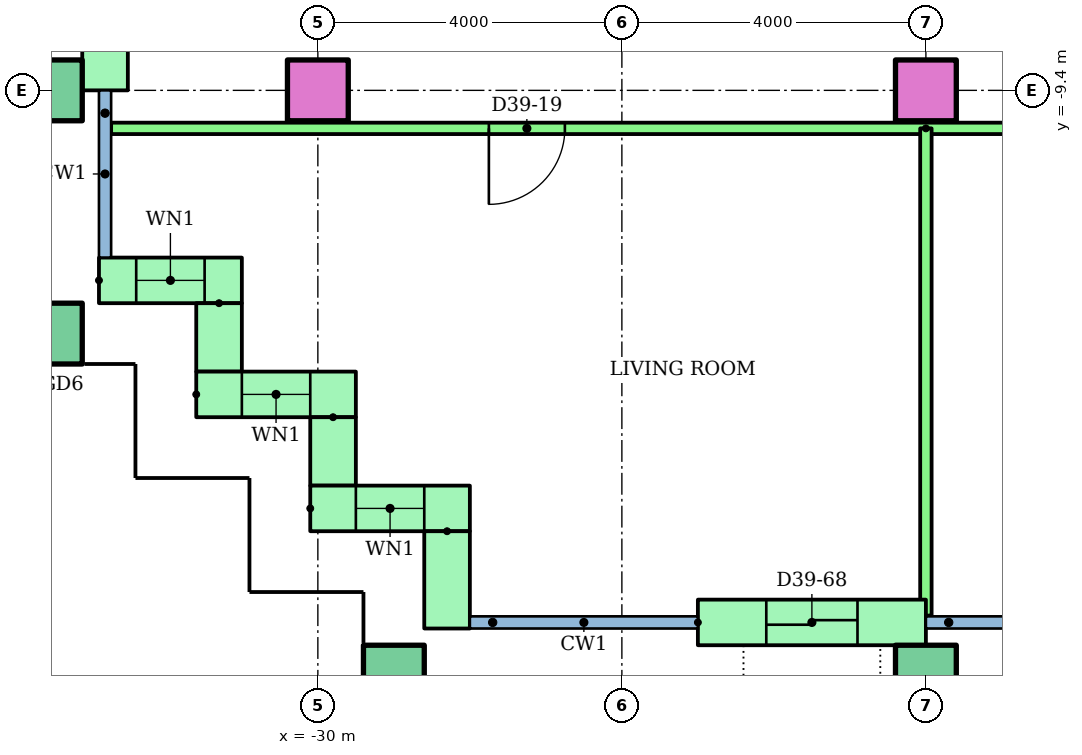
"""IFC4 building model, lengths in metres.
Left out: names, types, materials, properties, quantities, classifications, styles, units other than length and angle.
Written with IfcOpenShell. Run it as: python <this file> out.ifc"""

import sys

from ifc_helpers import new_model, si_unit, direction, frame, frame_2d, origin, origin_2d, place, context, subcontext, project, spatial, rectangle, hollow_rectangle, extrude, element, fill, save


model = new_model("IFC4")
c1 = context("Model", 3, precision=1e-05, world=origin(), true_north=direction((0.0, 1.0)))
c2 = subcontext(c1, "Body", "Model", "MODEL_VIEW")
j1 = project(units=[si_unit("LENGTHUNIT", "METRE"), si_unit("PLANEANGLEUNIT", "RADIAN")], contexts=[c1])
p1 = place(None, origin())
s1 = spatial("IfcSite", under=j1, at=p1, CompositionType="ELEMENT")
p2 = place(p1, origin())
s2 = spatial("IfcBuilding", under=s1, at=p2, CompositionType="ELEMENT")
p3 = place(p2, frame((0.0, 0.0, 148.6)))
s3 = spatial("IfcBuildingStorey", under=s2, at=p3, CompositionType="ELEMENT", Elevation=148.6)
for number, where in (
    (1, (-29.0, -17.1, 0.0)),
    (2, (-22.0, -17.1, 0.0)),
    (3, (-33.5, -12.6, 0.0)),
    (4, (-33.5, -9.4, 0.0)),
):
    element("IfcColumn", number, at=place(p3, frame(where)), inside=s3, PredefinedType="COLUMN", context=c2, shape_type="SweptSolid", body=[
        extrude(hollow_rectangle(XDim=0.8, YDim=0.8, WallThickness=0.04, at=origin_2d()), origin(), (0.0, 0.0, 1.0), 3.2),
    ])
for number, where in (
    (5, (-30.0, -9.4, 0.0)),
    (6, (-22.0, -9.4, 0.0)),
):
    element("IfcColumn", number, at=place(p3, frame(where)), inside=s3, PredefinedType="COLUMN", context=c2, shape_type="SweptSolid", body=[
        extrude(rectangle(XDim=0.8, YDim=0.8, at=origin_2d()), origin(), (0.0, 0.0, 1.0), 3.2),
    ])
p4 = place(p3, frame((-32.8, -5.7, 0.0), z_axis=(0.0, 0.0, 1.0), x_axis=(0.0, -1.0, 0.0)))
e7 = element("IfcWall", 7, at=p4, inside=s3, PredefinedType="STANDARD", context=c2, shape_type="SweptSolid", body=[
    extrude(rectangle(XDim=3.7, YDim=0.6, at=frame_2d((1.85, 0.0))), origin(), (0.0, 0.0, 1.0), 2.8),
])
p5 = place(p4, frame((1.25, 0.0, 0.0)))
e8 = element("IfcOpeningElement", 8, at=p5, cuts=e7, PredefinedType="OPENING", context=c2, shape_type="SweptSolid", body=[
    extrude(rectangle(XDim=1.2, YDim=2.1, at=frame_2d((0.6, 1.05))), frame((0.0, 0.31, 0.0), z_axis=(0.0, -1.0, 0.0), x_axis=(1.0, 0.0, 0.0)), (0.0, 0.0, 1.0), 0.62),
])
p6 = place(p3, frame((-32.88, -11.9, 0.0)))
e9 = element("IfcWall", 9, at=p6, inside=s3, PredefinedType="STANDARD", context=c2, shape_type="SweptSolid", body=[
    extrude(rectangle(XDim=1.88, YDim=0.6, at=frame_2d((0.94, 0.0))), origin(), (0.0, 0.0, 1.0), 2.8),
])
p7 = place(p6, frame((0.49, 0.0, 0.9)))
e10 = element("IfcOpeningElement", 10, at=p7, cuts=e9, PredefinedType="OPENING", context=c2, shape_type="SweptSolid", body=[
    extrude(rectangle(XDim=0.9, YDim=1.5, at=frame_2d((0.45, 0.75))), frame((0.0, 0.31, 0.0), z_axis=(0.0, -1.0, 0.0), x_axis=(1.0, 0.0, 0.0)), (0.0, 0.0, 1.0), 0.62),
])
p8 = place(p3, frame((-31.3, -12.2, 0.0), z_axis=(0.0, 0.0, 1.0), x_axis=(0.0, -1.0, 0.0)))
e11 = element("IfcWall", 11, at=p8, inside=s3, PredefinedType="STANDARD", context=c2, shape_type="SweptSolid", body=[
    extrude(rectangle(XDim=0.9, YDim=0.6, at=frame_2d((0.45, 0.0))), origin(), (0.0, 0.0, 1.0), 2.8),
])
p9 = place(p3, frame((-31.6, -13.4, 0.0)))
e12 = element("IfcWall", 12, at=p9, inside=s3, PredefinedType="STANDARD", context=c2, shape_type="SweptSolid", body=[
    extrude(rectangle(XDim=2.1, YDim=0.6, at=frame_2d((1.05, 0.0))), origin(), (0.0, 0.0, 1.0), 2.8),
])
p10 = place(p9, frame((0.6, 0.0, 0.9)))
e13 = element("IfcOpeningElement", 13, at=p10, cuts=e12, PredefinedType="OPENING", context=c2, shape_type="SweptSolid", body=[
    extrude(rectangle(XDim=0.9, YDim=1.5, at=frame_2d((0.45, 0.75))), frame((0.0, 0.31, 0.0), z_axis=(0.0, -1.0, 0.0), x_axis=(1.0, 0.0, 0.0)), (0.0, 0.0, 1.0), 0.62),
])
p11 = place(p3, frame((-29.8, -13.7, 0.0), z_axis=(0.0, 0.0, 1.0), x_axis=(0.0, -1.0, 0.0)))
e14 = element("IfcWall", 14, at=p11, inside=s3, PredefinedType="STANDARD", context=c2, shape_type="SweptSolid", body=[
    extrude(rectangle(XDim=0.9, YDim=0.6, at=frame_2d((0.45, 0.0))), origin(), (0.0, 0.0, 1.0), 2.8),
])
p12 = place(p3, frame((-30.1, -14.9, 0.0)))
e15 = element("IfcWall", 15, at=p12, inside=s3, PredefinedType="STANDARD", context=c2, shape_type="SweptSolid", body=[
    extrude(rectangle(XDim=2.1, YDim=0.6, at=frame_2d((1.05, 0.0))), origin(), (0.0, 0.0, 1.0), 2.8),
])
p13 = place(p12, frame((0.6, 0.0, 0.9)))
e16 = element("IfcOpeningElement", 16, at=p13, cuts=e15, PredefinedType="OPENING", context=c2, shape_type="SweptSolid", body=[
    extrude(rectangle(XDim=0.9, YDim=1.5, at=frame_2d((0.45, 0.75))), frame((0.0, 0.31, 0.0), z_axis=(0.0, -1.0, 0.0), x_axis=(1.0, 0.0, 0.0)), (0.0, 0.0, 1.0), 0.62),
])
p14 = place(p3, frame((-28.3, -15.2, 0.0), z_axis=(0.0, 0.0, 1.0), x_axis=(0.0, -1.0, 0.0)))
e17 = element("IfcWall", 17, at=p14, inside=s3, PredefinedType="STANDARD", context=c2, shape_type="SweptSolid", body=[
    extrude(rectangle(XDim=1.28, YDim=0.6, at=frame_2d((0.64, 0.0))), origin(), (0.0, 0.0, 1.0), 2.8),
])
p15 = place(p3, frame((-25.0, -16.4, 0.0)))
e18 = element("IfcWall", 18, at=p15, inside=s3, PredefinedType="STANDARD", context=c2, shape_type="SweptSolid", body=[
    extrude(rectangle(XDim=3.0, YDim=0.6, at=frame_2d((1.5, 0.0))), origin(), (0.0, 0.0, 1.0), 2.8),
])
p16 = place(p15, frame((0.9, 0.0, 0.0)))
e19 = element("IfcOpeningElement", 19, at=p16, cuts=e18, PredefinedType="OPENING", context=c2, shape_type="SweptSolid", body=[
    extrude(rectangle(XDim=1.2, YDim=2.1, at=frame_2d((0.6, 1.05))), frame((0.0, 0.31, 0.0), z_axis=(0.0, -1.0, 0.0), x_axis=(1.0, 0.0, 0.0)), (0.0, 0.0, 1.0), 0.62),
])
p17 = place(p3, frame((-6.0, -9.9, 0.0), z_axis=(0.0, 0.0, 1.0), x_axis=(-1.0, 0.0, 0.0)))
e20 = element("IfcWall", 20, at=p17, inside=s3, PredefinedType="PARTITIONING", context=c2, shape_type="SweptSolid", body=[
    extrude(rectangle(XDim=26.72, YDim=0.15, at=frame_2d((13.36, 0.0))), origin(), (0.0, 0.0, 1.0), 2.4),
])
p18 = place(p17, frame((20.75, 0.0, 0.0)))
e21 = element("IfcOpeningElement", 21, at=p18, cuts=e20, PredefinedType="OPENING", context=c2, shape_type="SweptSolid", body=[
    extrude(rectangle(XDim=1.0, YDim=2.1, at=frame_2d((0.5, 1.05))), frame((0.0, 0.085, 0.0), z_axis=(0.0, -1.0, 0.0), x_axis=(1.0, 0.0, 0.0)), (0.0, 0.0, 1.0), 0.17),
])
p19 = place(p17, frame((13.55, 0.0, 0.0)))
e22 = element("IfcOpeningElement", 22, at=p19, cuts=e20, PredefinedType="OPENING", context=c2, shape_type="SweptSolid", body=[
    extrude(rectangle(XDim=0.9, YDim=2.1, at=frame_2d((0.45, 1.05))), frame((0.0, 0.085, 0.0), z_axis=(0.0, -1.0, 0.0), x_axis=(1.0, 0.0, 0.0)), (0.0, 0.0, 1.0), 0.17),
])
p20 = place(p17, frame((9.55, 0.0, 0.0)))
e23 = element("IfcOpeningElement", 23, at=p20, cuts=e20, PredefinedType="OPENING", context=c2, shape_type="SweptSolid", body=[
    extrude(rectangle(XDim=0.9, YDim=2.1, at=frame_2d((0.45, 1.05))), frame((0.0, 0.085, 0.0), z_axis=(0.0, -1.0, 0.0), x_axis=(1.0, 0.0, 0.0)), (0.0, 0.0, 1.0), 0.17),
])
p21 = place(p17, frame((5.55, 0.0, 0.0)))
e24 = element("IfcOpeningElement", 24, at=p21, cuts=e20, PredefinedType="OPENING", context=c2, shape_type="SweptSolid", body=[
    extrude(rectangle(XDim=0.9, YDim=2.1, at=frame_2d((0.45, 1.05))), frame((0.0, 0.085, 0.0), z_axis=(0.0, -1.0, 0.0), x_axis=(1.0, 0.0, 0.0)), (0.0, 0.0, 1.0), 0.17),
])
p22 = place(p17, frame((1.55, 0.0, 0.0)))
e25 = element("IfcOpeningElement", 25, at=p22, cuts=e20, PredefinedType="OPENING", context=c2, shape_type="SweptSolid", body=[
    extrude(rectangle(XDim=0.9, YDim=2.1, at=frame_2d((0.45, 1.05))), frame((0.0, 0.085, 0.0), z_axis=(0.0, -1.0, 0.0), x_axis=(1.0, 0.0, 0.0)), (0.0, 0.0, 1.0), 0.17),
])
p23 = place(p3, frame((-22.0, -9.9, 0.0), z_axis=(0.0, 0.0, 1.0), x_axis=(0.0, -1.0, 0.0)))
e26 = element("IfcWall", 26, at=p23, inside=s3, PredefinedType="PARTITIONING", context=c2, shape_type="SweptSolid", body=[
    extrude(rectangle(XDim=6.41, YDim=0.15, at=frame_2d((3.205, 0.0))), origin(), (0.0, 0.0, 1.0), 2.4),
])
p24 = place(p7, origin())
e27 = element("IfcWindow", 27, at=p24, inside=s3, PartitioningType="SINGLE_PANEL", PredefinedType="WINDOW", context=c2, shape_type="SweptSolid", body=[
    extrude(rectangle(XDim=0.9, YDim=1.5, at=frame_2d((0.45, 0.75))), frame((0.0, 0.03, 0.0), z_axis=(0.0, -1.0, 0.0), x_axis=(1.0, 0.0, 0.0)), (0.0, 0.0, 1.0), 0.06),
])
fill(e10, e27)
p25 = place(p10, origin())
e28 = element("IfcWindow", 28, at=p25, inside=s3, PartitioningType="SINGLE_PANEL", PredefinedType="WINDOW", context=c2, shape_type="SweptSolid", body=[
    extrude(rectangle(XDim=0.9, YDim=1.5, at=frame_2d((0.45, 0.75))), frame((0.0, 0.03, 0.0), z_axis=(0.0, -1.0, 0.0), x_axis=(1.0, 0.0, 0.0)), (0.0, 0.0, 1.0), 0.06),
])
fill(e13, e28)
p26 = place(p13, origin())
e29 = element("IfcWindow", 29, at=p26, inside=s3, PartitioningType="SINGLE_PANEL", PredefinedType="WINDOW", context=c2, shape_type="SweptSolid", body=[
    extrude(rectangle(XDim=0.9, YDim=1.5, at=frame_2d((0.45, 0.75))), frame((0.0, 0.03, 0.0), z_axis=(0.0, -1.0, 0.0), x_axis=(1.0, 0.0, 0.0)), (0.0, 0.0, 1.0), 0.06),
])
fill(e16, e29)
p27 = place(p18, origin())
e30 = element("IfcDoor", 30, at=p27, inside=s3, OperationType="SINGLE_SWING_RIGHT", PredefinedType="DOOR", context=c2, shape_type="SweptSolid", body=[
    extrude(rectangle(XDim=1.0, YDim=2.1, at=frame_2d((0.5, 1.05))), frame((0.0, 0.025, 0.0), z_axis=(0.0, -1.0, 0.0), x_axis=(1.0, 0.0, 0.0)), (0.0, 0.0, 1.0), 0.05),
])
fill(e21, e30)
p28 = place(p16, origin())
e31 = element("IfcDoor", 31, at=p28, inside=s3, OperationType="SLIDING_TO_LEFT", PredefinedType="DOOR", context=c2, shape_type="SweptSolid", body=[
    extrude(rectangle(XDim=1.2, YDim=2.1, at=frame_2d((0.6, 1.05))), frame((0.0, 0.025, 0.0), z_axis=(0.0, -1.0, 0.0), x_axis=(1.0, 0.0, 0.0)), (0.0, 0.0, 1.0), 0.05),
])
fill(e19, e31)
save(model, sys.argv[1])
